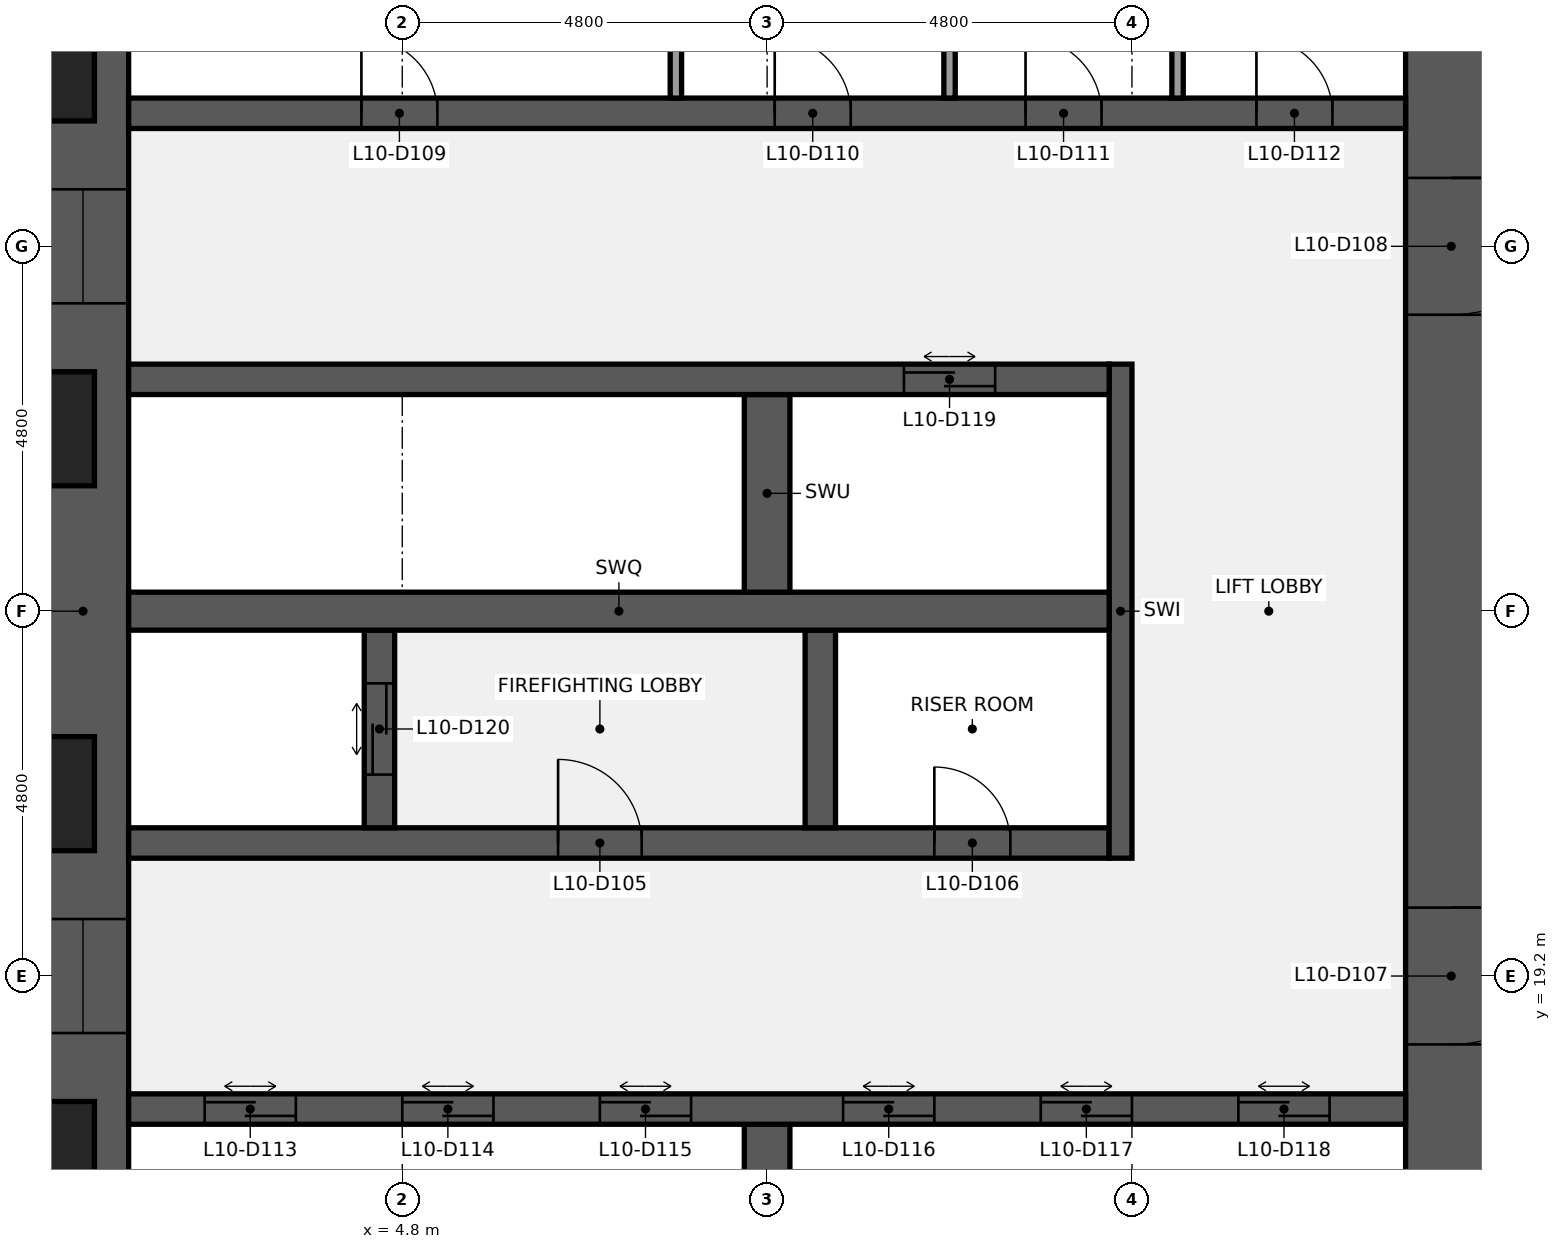
"""IFC4 building model, lengths in metres.
Left out: names, types, materials, properties, quantities, classifications, styles, units other than length and angle.
Written with IfcOpenShell. Run it as: python <this file> out.ifc"""

import sys

from ifc_helpers import new_model, si_unit, direction, frame, frame_2d, origin, place, context, subcontext, project, spatial, rectangle, extrude, element, fill, save


model = new_model("IFC4")
c1 = context("Model", 3, precision=1e-05, world=origin(), true_north=direction((0.0, 1.0)))
c2 = subcontext(c1, "Body", "Model", "MODEL_VIEW")
j1 = project(units=[si_unit("LENGTHUNIT", "METRE"), si_unit("PLANEANGLEUNIT", "RADIAN")], contexts=[c1])
p1 = place(None, origin())
s1 = spatial("IfcSite", under=j1, at=p1, CompositionType="ELEMENT")
p2 = place(p1, origin())
s2 = spatial("IfcBuilding", under=s1, at=p2, CompositionType="ELEMENT")
p3 = place(p2, frame((0.0, 0.0, 51.0)))
s3 = spatial("IfcBuildingStorey", under=s2, at=p3, CompositionType="ELEMENT", Elevation=51.0)
p4 = place(p3, frame((0.6, 9.6, 0.0), z_axis=(0.0, 0.0, 1.0), x_axis=(0.0, 1.0, 0.0)))
e1 = element("IfcWall", 1, at=p4, inside=s3, PredefinedType="SHEAR", context=c2, shape_type="SweptSolid", body=[
    extrude(rectangle(XDim=28.8, YDim=1.2, at=frame_2d((14.4, 0.0))), origin(), (0.0, 0.0, 1.0), 3.84),
])
p5 = place(p4, frame((8.85, 0.0, 0.9)))
e2 = element("IfcOpeningElement", 2, at=p5, cuts=e1, PredefinedType="OPENING", context=c2, shape_type="SweptSolid", body=[
    extrude(rectangle(XDim=1.5, YDim=1.5, at=frame_2d((0.75, 0.75))), frame((0.0, 0.61, 0.0), z_axis=(0.0, -1.0, 0.0), x_axis=(1.0, 0.0, 0.0)), (0.0, 0.0, 1.0), 1.22),
])
p6 = place(p4, frame((18.45, 0.0, 0.9)))
e3 = element("IfcOpeningElement", 3, at=p6, cuts=e1, PredefinedType="OPENING", context=c2, shape_type="SweptSolid", body=[
    extrude(rectangle(XDim=1.5, YDim=1.5, at=frame_2d((0.75, 0.75))), frame((0.0, 0.61, 0.0), z_axis=(0.0, -1.0, 0.0), x_axis=(1.0, 0.0, 0.0)), (0.0, 0.0, 1.0), 1.22),
])
p7 = place(p3, frame((18.6, 38.4, 0.0), z_axis=(0.0, 0.0, 1.0), x_axis=(0.0, -1.0, 0.0)))
e4 = element("IfcWall", 4, at=p7, inside=s3, PredefinedType="SHEAR", context=c2, shape_type="SweptSolid", body=[
    extrude(rectangle(XDim=28.8, YDim=1.2, at=frame_2d((14.4, 0.0))), origin(), (0.0, 0.0, 1.0), 3.84),
])
p8 = place(p7, frame((18.3, 0.0, 0.0)))
e5 = element("IfcOpeningElement", 5, at=p8, cuts=e4, PredefinedType="OPENING", context=c2, shape_type="SweptSolid", body=[
    extrude(rectangle(XDim=1.8, YDim=2.1, at=frame_2d((0.9, 1.05))), frame((0.0, 0.61, 0.0), z_axis=(0.0, -1.0, 0.0), x_axis=(1.0, 0.0, 0.0)), (0.0, 0.0, 1.0), 1.22),
])
p9 = place(p7, frame((8.7, 0.0, 0.0)))
e6 = element("IfcOpeningElement", 6, at=p9, cuts=e4, PredefinedType="OPENING", context=c2, shape_type="SweptSolid", body=[
    extrude(rectangle(XDim=1.8, YDim=2.1, at=frame_2d((0.9, 1.05))), frame((0.0, 0.61, 0.0), z_axis=(0.0, -1.0, 0.0), x_axis=(1.0, 0.0, 0.0)), (0.0, 0.0, 1.0), 1.22),
])
p10 = place(p3, frame((9.6, 14.65, 0.0), z_axis=(0.0, 0.0, 1.0), x_axis=(0.0, 1.0, 0.0)))
e7 = element("IfcWall", 7, at=p10, inside=s3, PredefinedType="SHEAR", context=c2, shape_type="SweptSolid", body=[
    extrude(rectangle(XDim=2.6, YDim=0.6, at=frame_2d((1.3, 0.0))), origin(), (0.0, 0.0, 1.0), 3.84),
])
p11 = place(p3, frame((1.2, 17.45, 0.0), z_axis=(0.0, 0.0, 1.0), x_axis=(1.0, 0.0, 0.0)))
e8 = element("IfcWall", 8, at=p11, inside=s3, PredefinedType="SHEAR", context=c2, shape_type="SweptSolid", body=[
    extrude(rectangle(XDim=16.8, YDim=0.4, at=frame_2d((8.4, 0.0))), origin(), (0.0, 0.0, 1.0), 3.84),
])
p12 = place(p11, frame((1.0, 0.0, 0.0)))
e9 = element("IfcOpeningElement", 9, at=p12, cuts=e8, PredefinedType="OPENING", context=c2, shape_type="SweptSolid", body=[
    extrude(rectangle(XDim=1.2, YDim=2.1, at=frame_2d((0.6, 1.05))), frame((0.0, 0.21, 0.0), z_axis=(0.0, -1.0, 0.0), x_axis=(1.0, 0.0, 0.0)), (0.0, 0.0, 1.0), 0.42),
])
p13 = place(p11, frame((3.6, 0.0, 0.0)))
e10 = element("IfcOpeningElement", 10, at=p13, cuts=e8, PredefinedType="OPENING", context=c2, shape_type="SweptSolid", body=[
    extrude(rectangle(XDim=1.2, YDim=2.1, at=frame_2d((0.6, 1.05))), frame((0.0, 0.21, 0.0), z_axis=(0.0, -1.0, 0.0), x_axis=(1.0, 0.0, 0.0)), (0.0, 0.0, 1.0), 0.42),
])
p14 = place(p11, frame((6.2, 0.0, 0.0)))
e11 = element("IfcOpeningElement", 11, at=p14, cuts=e8, PredefinedType="OPENING", context=c2, shape_type="SweptSolid", body=[
    extrude(rectangle(XDim=1.2, YDim=2.1, at=frame_2d((0.6, 1.05))), frame((0.0, 0.21, 0.0), z_axis=(0.0, -1.0, 0.0), x_axis=(1.0, 0.0, 0.0)), (0.0, 0.0, 1.0), 0.42),
])
p15 = place(p11, frame((9.4, 0.0, 0.0)))
e12 = element("IfcOpeningElement", 12, at=p15, cuts=e8, PredefinedType="OPENING", context=c2, shape_type="SweptSolid", body=[
    extrude(rectangle(XDim=1.2, YDim=2.1, at=frame_2d((0.6, 1.05))), frame((0.0, 0.21, 0.0), z_axis=(0.0, -1.0, 0.0), x_axis=(1.0, 0.0, 0.0)), (0.0, 0.0, 1.0), 0.42),
])
p16 = place(p11, frame((12.0, 0.0, 0.0)))
e13 = element("IfcOpeningElement", 13, at=p16, cuts=e8, PredefinedType="OPENING", context=c2, shape_type="SweptSolid", body=[
    extrude(rectangle(XDim=1.2, YDim=2.1, at=frame_2d((0.6, 1.05))), frame((0.0, 0.21, 0.0), z_axis=(0.0, -1.0, 0.0), x_axis=(1.0, 0.0, 0.0)), (0.0, 0.0, 1.0), 0.42),
])
p17 = place(p11, frame((14.6, 0.0, 0.0)))
e14 = element("IfcOpeningElement", 14, at=p17, cuts=e8, PredefinedType="OPENING", context=c2, shape_type="SweptSolid", body=[
    extrude(rectangle(XDim=1.2, YDim=2.1, at=frame_2d((0.6, 1.05))), frame((0.0, 0.21, 0.0), z_axis=(0.0, -1.0, 0.0), x_axis=(1.0, 0.0, 0.0)), (0.0, 0.0, 1.0), 0.42),
])
p18 = place(p3, frame((1.2, 20.95, 0.0), z_axis=(0.0, 0.0, 1.0), x_axis=(1.0, 0.0, 0.0)))
e15 = element("IfcWall", 15, at=p18, inside=s3, PredefinedType="SHEAR", context=c2, shape_type="SweptSolid", body=[
    extrude(rectangle(XDim=12.9, YDim=0.4, at=frame_2d((6.45, 0.0))), origin(), (0.0, 0.0, 1.0), 3.84),
])
p19 = place(p18, frame((5.65, 0.0, 0.0)))
e16 = element("IfcOpeningElement", 16, at=p19, cuts=e15, PredefinedType="OPENING", context=c2, shape_type="SweptSolid", body=[
    extrude(rectangle(XDim=1.1, YDim=2.1, at=frame_2d((0.55, 1.05))), frame((0.0, 0.21, 0.0), z_axis=(0.0, -1.0, 0.0), x_axis=(1.0, 0.0, 0.0)), (0.0, 0.0, 1.0), 0.42),
])
p20 = place(p18, frame((10.6, 0.0, 0.0)))
e17 = element("IfcOpeningElement", 17, at=p20, cuts=e15, PredefinedType="OPENING", context=c2, shape_type="SweptSolid", body=[
    extrude(rectangle(XDim=1.0, YDim=2.1, at=frame_2d((0.5, 1.05))), frame((0.0, 0.21, 0.0), z_axis=(0.0, -1.0, 0.0), x_axis=(1.0, 0.0, 0.0)), (0.0, 0.0, 1.0), 0.42),
])
p21 = place(p3, frame((14.25, 20.75, 0.0), z_axis=(0.0, 0.0, 1.0), x_axis=(0.0, 1.0, 0.0)))
e18 = element("IfcWall", 18, at=p21, inside=s3, PredefinedType="SHEAR", context=c2, shape_type="SweptSolid", body=[
    extrude(rectangle(XDim=6.5, YDim=0.3, at=frame_2d((3.25, 0.0))), origin(), (0.0, 0.0, 1.0), 3.84),
])
p22 = place(p3, frame((4.5, 21.15, 0.0), z_axis=(0.0, 0.0, 1.0), x_axis=(0.0, 1.0, 0.0)))
e19 = element("IfcWall", 19, at=p22, inside=s3, PredefinedType="SHEAR", context=c2, shape_type="SweptSolid", body=[
    extrude(rectangle(XDim=2.6, YDim=0.4, at=frame_2d((1.3, 0.0))), origin(), (0.0, 0.0, 1.0), 3.84),
])
p23 = place(p22, frame((0.7, 0.0, 0.0)))
e20 = element("IfcOpeningElement", 20, at=p23, cuts=e19, PredefinedType="OPENING", context=c2, shape_type="SweptSolid", body=[
    extrude(rectangle(XDim=1.2, YDim=2.1, at=frame_2d((0.6, 1.05))), frame((0.0, 0.21, 0.0), z_axis=(0.0, -1.0, 0.0), x_axis=(1.0, 0.0, 0.0)), (0.0, 0.0, 1.0), 0.42),
])
p24 = place(p3, frame((10.3, 21.15, 0.0), z_axis=(0.0, 0.0, 1.0), x_axis=(0.0, 1.0, 0.0)))
e21 = element("IfcWall", 21, at=p24, inside=s3, PredefinedType="SHEAR", context=c2, shape_type="SweptSolid", body=[
    extrude(rectangle(XDim=2.6, YDim=0.4, at=frame_2d((1.3, 0.0))), origin(), (0.0, 0.0, 1.0), 3.84),
])
p25 = place(p3, frame((1.2, 24.0, 0.0), z_axis=(0.0, 0.0, 1.0), x_axis=(1.0, 0.0, 0.0)))
e22 = element("IfcWall", 22, at=p25, inside=s3, PredefinedType="SHEAR", context=c2, shape_type="SweptSolid", body=[
    extrude(rectangle(XDim=12.9, YDim=0.5, at=frame_2d((6.45, 0.0))), origin(), (0.0, 0.0, 1.0), 3.84),
])
p26 = place(p3, frame((9.6, 24.25, 0.0), z_axis=(0.0, 0.0, 1.0), x_axis=(0.0, 1.0, 0.0)))
e23 = element("IfcWall", 23, at=p26, inside=s3, PredefinedType="SHEAR", context=c2, shape_type="SweptSolid", body=[
    extrude(rectangle(XDim=2.6, YDim=0.6, at=frame_2d((1.3, 0.0))), origin(), (0.0, 0.0, 1.0), 3.84),
])
p27 = place(p3, frame((1.2, 27.05, 0.0), z_axis=(0.0, 0.0, 1.0), x_axis=(1.0, 0.0, 0.0)))
e24 = element("IfcWall", 24, at=p27, inside=s3, PredefinedType="SHEAR", context=c2, shape_type="SweptSolid", body=[
    extrude(rectangle(XDim=12.9, YDim=0.4, at=frame_2d((6.45, 0.0))), origin(), (0.0, 0.0, 1.0), 3.84),
])
p28 = place(p27, frame((10.2, 0.0, 0.0)))
e25 = element("IfcOpeningElement", 25, at=p28, cuts=e24, PredefinedType="OPENING", context=c2, shape_type="SweptSolid", body=[
    extrude(rectangle(XDim=1.2, YDim=2.1, at=frame_2d((0.6, 1.05))), frame((0.0, 0.21, 0.0), z_axis=(0.0, -1.0, 0.0), x_axis=(1.0, 0.0, 0.0)), (0.0, 0.0, 1.0), 0.42),
])
p29 = place(p3, frame((1.2, 30.55, 0.0), z_axis=(0.0, 0.0, 1.0), x_axis=(1.0, 0.0, 0.0)))
e26 = element("IfcWall", 26, at=p29, inside=s3, PredefinedType="SHEAR", context=c2, shape_type="SweptSolid", body=[
    extrude(rectangle(XDim=16.8, YDim=0.4, at=frame_2d((8.4, 0.0))), origin(), (0.0, 0.0, 1.0), 3.84),
])
p30 = place(p29, frame((3.062, 0.0, 0.0)))
e27 = element("IfcOpeningElement", 27, at=p30, cuts=e26, PredefinedType="OPENING", context=c2, shape_type="SweptSolid", body=[
    extrude(rectangle(XDim=1.0, YDim=2.1, at=frame_2d((0.5, 1.05))), frame((0.0, 0.21, 0.0), z_axis=(0.0, -1.0, 0.0), x_axis=(1.0, 0.0, 0.0)), (0.0, 0.0, 1.0), 0.42),
])
p31 = place(p29, frame((8.5, 0.0, 0.0)))
e28 = element("IfcOpeningElement", 28, at=p31, cuts=e26, PredefinedType="OPENING", context=c2, shape_type="SweptSolid", body=[
    extrude(rectangle(XDim=1.0, YDim=2.1, at=frame_2d((0.5, 1.05))), frame((0.0, 0.21, 0.0), z_axis=(0.0, -1.0, 0.0), x_axis=(1.0, 0.0, 0.0)), (0.0, 0.0, 1.0), 0.42),
])
p32 = place(p29, frame((11.8, 0.0, 0.0)))
e29 = element("IfcOpeningElement", 29, at=p32, cuts=e26, PredefinedType="OPENING", context=c2, shape_type="SweptSolid", body=[
    extrude(rectangle(XDim=1.0, YDim=2.1, at=frame_2d((0.5, 1.05))), frame((0.0, 0.21, 0.0), z_axis=(0.0, -1.0, 0.0), x_axis=(1.0, 0.0, 0.0)), (0.0, 0.0, 1.0), 0.42),
])
p33 = place(p29, frame((14.837, 0.0, 0.0)))
e30 = element("IfcOpeningElement", 30, at=p33, cuts=e26, PredefinedType="OPENING", context=c2, shape_type="SweptSolid", body=[
    extrude(rectangle(XDim=1.0, YDim=2.1, at=frame_2d((0.5, 1.05))), frame((0.0, 0.21, 0.0), z_axis=(0.0, -1.0, 0.0), x_axis=(1.0, 0.0, 0.0)), (0.0, 0.0, 1.0), 0.42),
])
for number, where, z_axis, x_axis in (
    (31, (8.4, 30.75, 0.0), (0.0, 0.0, 1.0), (0.0, 1.0, 0.0)),
    (32, (12.0, 30.75, 0.0), (0.0, 0.0, 1.0), (0.0, 1.0, 0.0)),
    (33, (15.0, 30.75, 0.0), (0.0, 0.0, 1.0), (0.0, 1.0, 0.0)),
):
    element("IfcWall", number, at=place(p3, frame(where, z_axis=z_axis, x_axis=x_axis)), inside=s3, PredefinedType="PARTITIONING", context=c2, shape_type="SweptSolid", body=[
        extrude(rectangle(XDim=2.6, YDim=0.15, at=frame_2d((1.3, 0.0))), origin(), (0.0, 0.0, 1.0), 3.84),
    ])
p34 = place(p19, origin())
e34 = element("IfcDoor", 34, at=p34, inside=s3, OperationType="SINGLE_SWING_LEFT", PredefinedType="DOOR", context=c2, shape_type="SweptSolid", body=[
    extrude(rectangle(XDim=1.1, YDim=2.1, at=frame_2d((0.55, 1.05))), frame((0.0, 0.025, 0.0), z_axis=(0.0, -1.0, 0.0), x_axis=(1.0, 0.0, 0.0)), (0.0, 0.0, 1.0), 0.05),
])
fill(e16, e34)
p35 = place(p20, origin())
e35 = element("IfcDoor", 35, at=p35, inside=s3, OperationType="SINGLE_SWING_LEFT", PredefinedType="DOOR", context=c2, shape_type="SweptSolid", body=[
    extrude(rectangle(XDim=1.0, YDim=2.1, at=frame_2d((0.5, 1.05))), frame((0.0, 0.025, 0.0), z_axis=(0.0, -1.0, 0.0), x_axis=(1.0, 0.0, 0.0)), (0.0, 0.0, 1.0), 0.05),
])
fill(e17, e35)
p36 = place(p8, origin())
e36 = element("IfcDoor", 36, at=p36, inside=s3, OperationType="DOUBLE_DOOR_SINGLE_SWING", PredefinedType="DOOR", context=c2, shape_type="SweptSolid", body=[
    extrude(rectangle(XDim=1.8, YDim=2.1, at=frame_2d((0.9, 1.05))), frame((0.0, 0.025, 0.0), z_axis=(0.0, -1.0, 0.0), x_axis=(1.0, 0.0, 0.0)), (0.0, 0.0, 1.0), 0.05),
])
fill(e5, e36)
p37 = place(p9, origin())
e37 = element("IfcDoor", 37, at=p37, inside=s3, OperationType="DOUBLE_DOOR_SINGLE_SWING", PredefinedType="DOOR", context=c2, shape_type="SweptSolid", body=[
    extrude(rectangle(XDim=1.8, YDim=2.1, at=frame_2d((0.9, 1.05))), frame((0.0, 0.025, 0.0), z_axis=(0.0, -1.0, 0.0), x_axis=(1.0, 0.0, 0.0)), (0.0, 0.0, 1.0), 0.05),
])
fill(e6, e37)
p38 = place(p30, origin())
e38 = element("IfcDoor", 38, at=p38, inside=s3, OperationType="SINGLE_SWING_LEFT", PredefinedType="DOOR", context=c2, shape_type="SweptSolid", body=[
    extrude(rectangle(XDim=1.0, YDim=2.1, at=frame_2d((0.5, 1.05))), frame((0.0, 0.025, 0.0), z_axis=(0.0, -1.0, 0.0), x_axis=(1.0, 0.0, 0.0)), (0.0, 0.0, 1.0), 0.05),
])
fill(e27, e38)
p39 = place(p31, origin())
e39 = element("IfcDoor", 39, at=p39, inside=s3, OperationType="SINGLE_SWING_LEFT", PredefinedType="DOOR", context=c2, shape_type="SweptSolid", body=[
    extrude(rectangle(XDim=1.0, YDim=2.1, at=frame_2d((0.5, 1.05))), frame((0.0, 0.025, 0.0), z_axis=(0.0, -1.0, 0.0), x_axis=(1.0, 0.0, 0.0)), (0.0, 0.0, 1.0), 0.05),
])
fill(e28, e39)
p40 = place(p32, origin())
e40 = element("IfcDoor", 40, at=p40, inside=s3, OperationType="SINGLE_SWING_LEFT", PredefinedType="DOOR", context=c2, shape_type="SweptSolid", body=[
    extrude(rectangle(XDim=1.0, YDim=2.1, at=frame_2d((0.5, 1.05))), frame((0.0, 0.025, 0.0), z_axis=(0.0, -1.0, 0.0), x_axis=(1.0, 0.0, 0.0)), (0.0, 0.0, 1.0), 0.05),
])
fill(e29, e40)
p41 = place(p33, origin())
e41 = element("IfcDoor", 41, at=p41, inside=s3, OperationType="SINGLE_SWING_LEFT", PredefinedType="DOOR", context=c2, shape_type="SweptSolid", body=[
    extrude(rectangle(XDim=1.0, YDim=2.1, at=frame_2d((0.5, 1.05))), frame((0.0, 0.025, 0.0), z_axis=(0.0, -1.0, 0.0), x_axis=(1.0, 0.0, 0.0)), (0.0, 0.0, 1.0), 0.05),
])
fill(e30, e41)
p42 = place(p12, origin())
e42 = element("IfcDoor", 42, at=p42, inside=s3, OperationType="DOUBLE_DOOR_SLIDING", PredefinedType="DOOR", context=c2, shape_type="SweptSolid", body=[
    extrude(rectangle(XDim=1.2, YDim=2.1, at=frame_2d((0.6, 1.05))), frame((0.0, 0.025, 0.0), z_axis=(0.0, -1.0, 0.0), x_axis=(1.0, 0.0, 0.0)), (0.0, 0.0, 1.0), 0.05),
])
fill(e9, e42)
p43 = place(p13, origin())
e43 = element("IfcDoor", 43, at=p43, inside=s3, OperationType="DOUBLE_DOOR_SLIDING", PredefinedType="DOOR", context=c2, shape_type="SweptSolid", body=[
    extrude(rectangle(XDim=1.2, YDim=2.1, at=frame_2d((0.6, 1.05))), frame((0.0, 0.025, 0.0), z_axis=(0.0, -1.0, 0.0), x_axis=(1.0, 0.0, 0.0)), (0.0, 0.0, 1.0), 0.05),
])
fill(e10, e43)
p44 = place(p14, origin())
e44 = element("IfcDoor", 44, at=p44, inside=s3, OperationType="DOUBLE_DOOR_SLIDING", PredefinedType="DOOR", context=c2, shape_type="SweptSolid", body=[
    extrude(rectangle(XDim=1.2, YDim=2.1, at=frame_2d((0.6, 1.05))), frame((0.0, 0.025, 0.0), z_axis=(0.0, -1.0, 0.0), x_axis=(1.0, 0.0, 0.0)), (0.0, 0.0, 1.0), 0.05),
])
fill(e11, e44)
p45 = place(p15, origin())
e45 = element("IfcDoor", 45, at=p45, inside=s3, OperationType="DOUBLE_DOOR_SLIDING", PredefinedType="DOOR", context=c2, shape_type="SweptSolid", body=[
    extrude(rectangle(XDim=1.2, YDim=2.1, at=frame_2d((0.6, 1.05))), frame((0.0, 0.025, 0.0), z_axis=(0.0, -1.0, 0.0), x_axis=(1.0, 0.0, 0.0)), (0.0, 0.0, 1.0), 0.05),
])
fill(e12, e45)
p46 = place(p16, origin())
e46 = element("IfcDoor", 46, at=p46, inside=s3, OperationType="DOUBLE_DOOR_SLIDING", PredefinedType="DOOR", context=c2, shape_type="SweptSolid", body=[
    extrude(rectangle(XDim=1.2, YDim=2.1, at=frame_2d((0.6, 1.05))), frame((0.0, 0.025, 0.0), z_axis=(0.0, -1.0, 0.0), x_axis=(1.0, 0.0, 0.0)), (0.0, 0.0, 1.0), 0.05),
])
fill(e13, e46)
p47 = place(p17, origin())
e47 = element("IfcDoor", 47, at=p47, inside=s3, OperationType="DOUBLE_DOOR_SLIDING", PredefinedType="DOOR", context=c2, shape_type="SweptSolid", body=[
    extrude(rectangle(XDim=1.2, YDim=2.1, at=frame_2d((0.6, 1.05))), frame((0.0, 0.025, 0.0), z_axis=(0.0, -1.0, 0.0), x_axis=(1.0, 0.0, 0.0)), (0.0, 0.0, 1.0), 0.05),
])
fill(e14, e47)
p48 = place(p28, origin())
e48 = element("IfcDoor", 48, at=p48, inside=s3, OperationType="DOUBLE_DOOR_SLIDING", PredefinedType="DOOR", context=c2, shape_type="SweptSolid", body=[
    extrude(rectangle(XDim=1.2, YDim=2.1, at=frame_2d((0.6, 1.05))), frame((0.0, 0.025, 0.0), z_axis=(0.0, -1.0, 0.0), x_axis=(1.0, 0.0, 0.0)), (0.0, 0.0, 1.0), 0.05),
])
fill(e25, e48)
p49 = place(p23, origin())
e49 = element("IfcDoor", 49, at=p49, inside=s3, OperationType="DOUBLE_DOOR_SLIDING", PredefinedType="DOOR", context=c2, shape_type="SweptSolid", body=[
    extrude(rectangle(XDim=1.2, YDim=2.1, at=frame_2d((0.6, 1.05))), frame((0.0, 0.025, 0.0), z_axis=(0.0, -1.0, 0.0), x_axis=(1.0, 0.0, 0.0)), (0.0, 0.0, 1.0), 0.05),
])
fill(e20, e49)
p50 = place(p5, origin())
e50 = element("IfcWindow", 50, at=p50, inside=s3, PartitioningType="SINGLE_PANEL", PredefinedType="WINDOW", context=c2, shape_type="SweptSolid", body=[
    extrude(rectangle(XDim=1.5, YDim=1.5, at=frame_2d((0.75, 0.75))), frame((0.0, 0.03, 0.0), z_axis=(0.0, -1.0, 0.0), x_axis=(1.0, 0.0, 0.0)), (0.0, 0.0, 1.0), 0.06),
])
fill(e2, e50)
p51 = place(p6, origin())
e51 = element("IfcWindow", 51, at=p51, inside=s3, PartitioningType="SINGLE_PANEL", PredefinedType="WINDOW", context=c2, shape_type="SweptSolid", body=[
    extrude(rectangle(XDim=1.5, YDim=1.5, at=frame_2d((0.75, 0.75))), frame((0.0, 0.03, 0.0), z_axis=(0.0, -1.0, 0.0), x_axis=(1.0, 0.0, 0.0)), (0.0, 0.0, 1.0), 0.06),
])
fill(e3, e51)
save(model, sys.argv[1])
